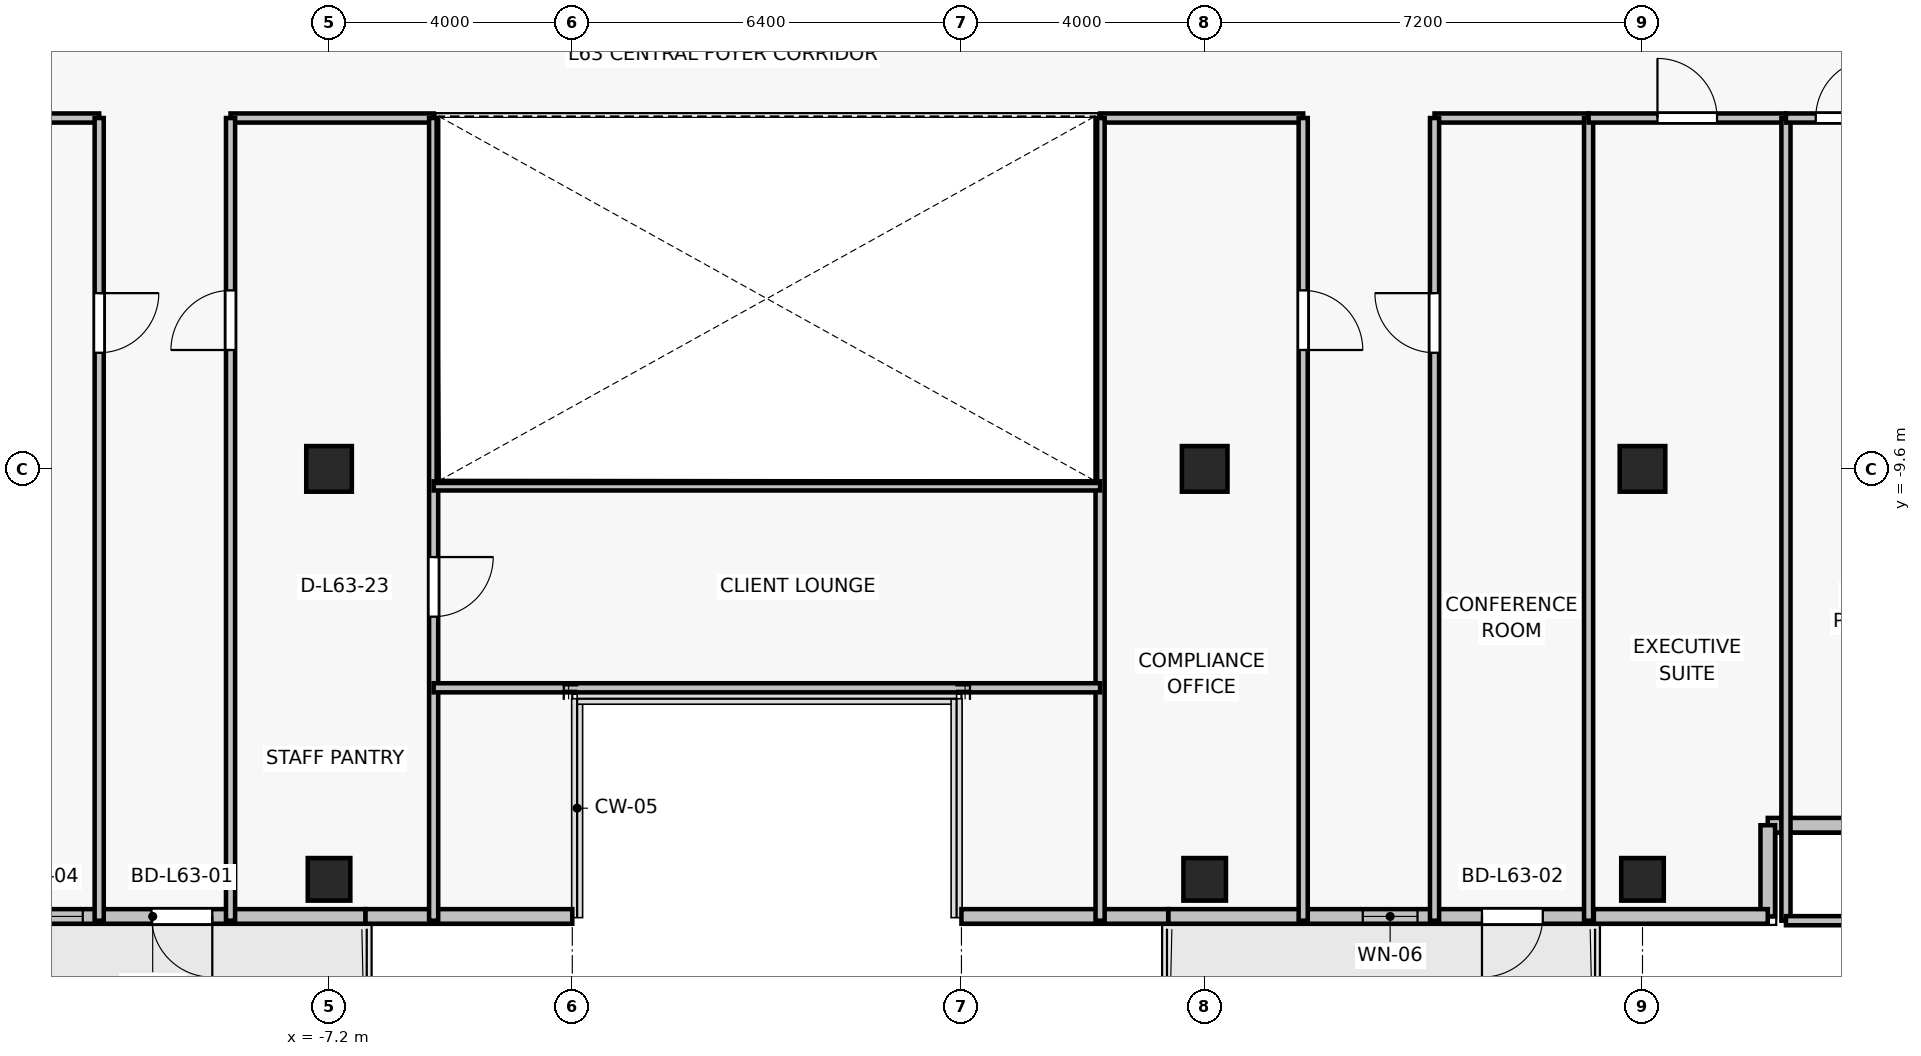
"""IFC4 building model, lengths in metres.
Left out: names, types, materials, properties, quantities, classifications, styles, units other than length and angle.
Written with IfcOpenShell. Run it as: python <this file> out.ifc"""

import sys

from ifc_helpers import new_model, si_unit, direction, frame, frame_2d, origin, origin_2d, place, context, subcontext, project, spatial, rectangle, extrude, source, transform, mapped, element, fill, save


model = new_model("IFC4")
c1 = context("Model", 3, precision=1e-05, world=origin(), true_north=direction((0.0, 1.0)))
c2 = subcontext(c1, "Body", "Model", "MODEL_VIEW")
j1 = project(units=[si_unit("LENGTHUNIT", "METRE"), si_unit("PLANEANGLEUNIT", "RADIAN")], contexts=[c1])
p1 = place(None, origin())
s1 = spatial("IfcSite", under=j1, at=p1, CompositionType="ELEMENT")
p2 = place(p1, origin())
s2 = spatial("IfcBuilding", under=s1, at=p2, CompositionType="ELEMENT")
p3 = place(p2, frame((0.0, 0.0, 225.4)))
s3 = spatial("IfcBuildingStorey", under=s2, at=p3, CompositionType="ELEMENT", Elevation=225.4)
for number, where, z_axis, x_axis in (
    (1, (-7.2, -9.6, 0.0), (0.0, 0.0, 1.0), (1.0, 0.0, 0.0)),
    (2, (7.2, -9.6, 0.0), (0.0, 0.0, 1.0), (1.0, 0.0, 0.0)),
    (3, (14.4, -9.6, 0.0), (0.0, 0.0, 1.0), (1.0, 0.0, 0.0)),
):
    element("IfcColumn", number, at=place(p3, frame(where, z_axis=z_axis, x_axis=x_axis)), inside=s3, PredefinedType="COLUMN", context=c2, shape_type="SweptSolid", body=[
        extrude(rectangle(XDim=0.75, YDim=0.75, at=origin_2d()), origin(), (0.0, 0.0, 1.0), 3.3),
    ])
for number, where, z_axis, x_axis in (
    (4, (-7.2, -16.35, 0.0), (0.0, 0.0, 1.0), (1.0, 0.0, 0.0)),
    (5, (7.2, -16.35, 0.0), (0.0, 0.0, 1.0), (1.0, 0.0, 0.0)),
    (6, (14.4, -16.35, 0.0), (0.0, 0.0, 1.0), (1.0, 0.0, 0.0)),
):
    element("IfcColumn", number, at=place(p3, frame(where, z_axis=z_axis, x_axis=x_axis)), inside=s3, PredefinedType="COLUMN", context=c2, shape_type="SweptSolid", body=[
        extrude(rectangle(XDim=0.7, YDim=0.7, at=origin_2d()), origin(), (0.0, 0.0, 1.0), 3.3),
    ])
p4 = place(p3, frame((-6.6, -16.96, 0.0), z_axis=(0.0, 0.0, 1.0), x_axis=(-1.0, 0.0, 0.0)))
e7 = element("IfcWall", 7, at=p4, inside=s3, PredefinedType="SOLIDWALL", context=c2, shape_type="SweptSolid", body=[
    extrude(rectangle(XDim=7.0, YDim=0.24, at=frame_2d((3.5, 0.0))), origin(), (0.0, 0.0, 1.0), 2.665),
])
p5 = place(p4, frame((2.52, 0.0, 0.0)))
e8 = element("IfcOpeningElement", 8, at=p5, cuts=e7, PredefinedType="OPENING", context=c2, shape_type="SweptSolid", body=[
    extrude(rectangle(XDim=1.0, YDim=2.2, at=frame_2d((0.5, 1.1))), frame((0.0, 0.13, 0.0), z_axis=(0.0, -1.0, 0.0), x_axis=(1.0, 0.0, 0.0)), (0.0, 0.0, 1.0), 0.26),
])
p6 = place(p4, frame((4.65, 0.0, 0.85)))
e9 = element("IfcOpeningElement", 9, at=p6, cuts=e7, PredefinedType="OPENING", context=c2, shape_type="SweptSolid", body=[
    extrude(rectangle(XDim=1.2, YDim=1.5, at=frame_2d((0.6, 0.75))), frame((0.0, 0.13, 0.0), z_axis=(0.0, -1.0, 0.0), x_axis=(1.0, 0.0, 0.0)), (0.0, 0.0, 1.0), 0.26),
])
p7 = place(p3, frame((13.6, -16.96, 0.0), z_axis=(0.0, 0.0, 1.0), x_axis=(-1.0, 0.0, 0.0)))
e10 = element("IfcWall", 10, at=p7, inside=s3, PredefinedType="SOLIDWALL", context=c2, shape_type="SweptSolid", body=[
    extrude(rectangle(XDim=7.0, YDim=0.24, at=frame_2d((3.5, 0.0))), origin(), (0.0, 0.0, 1.0), 2.665),
])
p8 = place(p7, frame((0.84, 0.0, 0.0)))
e11 = element("IfcOpeningElement", 11, at=p8, cuts=e10, PredefinedType="OPENING", context=c2, shape_type="SweptSolid", body=[
    extrude(rectangle(XDim=1.0, YDim=2.2, at=frame_2d((0.5, 1.1))), frame((0.0, 0.13, 0.0), z_axis=(0.0, -1.0, 0.0), x_axis=(1.0, 0.0, 0.0)), (0.0, 0.0, 1.0), 0.26),
])
p9 = place(p7, frame((2.9, 0.0, 0.85)))
e12 = element("IfcOpeningElement", 12, at=p9, cuts=e10, PredefinedType="OPENING", context=c2, shape_type="SweptSolid", body=[
    extrude(rectangle(XDim=0.9, YDim=1.35, at=frame_2d((0.45, 0.675))), frame((0.0, 0.13, 0.0), z_axis=(0.0, -1.0, 0.0), x_axis=(1.0, 0.0, 0.0)), (0.0, 0.0, 1.0), 0.26),
])
for number, where, z_axis, x_axis in (
    (13, (16.46, -15.46, 0.0), (0.0, 0.0, 1.0), (1.0, 0.0, 0.0)),
    (14, (16.46, -16.96, 0.0), (0.0, 0.0, 1.0), (0.0, 1.0, 0.0)),
):
    element("IfcWall", number, at=place(p3, frame(where, z_axis=z_axis, x_axis=x_axis)), inside=s3, PredefinedType="SOLIDWALL", context=c2, shape_type="SweptSolid", body=[
        extrude(rectangle(XDim=1.5, YDim=0.24, at=frame_2d((0.75, 0.0))), origin(), (0.0, 0.0, 1.0), 3.075),
    ])
p10 = place(p3, frame((13.6, -16.96, 0.0), z_axis=(0.0, 0.0, 1.0), x_axis=(1.0, 0.0, 0.0)))
e15 = element("IfcWall", 15, at=p10, inside=s3, PredefinedType="SOLIDWALL", context=c2, shape_type="SweptSolid", body=[
    extrude(rectangle(XDim=2.86, YDim=0.24, at=frame_2d((1.43, 0.0))), origin(), (0.0, 0.0, 1.0), 2.665),
])
for number, where, z_axis, x_axis in (
    (16, (3.2, -16.96, 0.0), (0.0, 0.0, 1.0), (1.0, 0.0, 0.0)),
    (17, (-6.6, -16.96, 0.0), (0.0, 0.0, 1.0), (1.0, 0.0, 0.0)),
):
    element("IfcWall", number, at=place(p3, frame(where, z_axis=z_axis, x_axis=x_axis)), inside=s3, PredefinedType="SOLIDWALL", context=c2, shape_type="SweptSolid", body=[
        extrude(rectangle(XDim=3.4, YDim=0.24, at=frame_2d((1.7, 0.0))), origin(), (0.0, 0.0, 1.0), 3.075),
    ])
p11 = place(p3, frame((-23.53, -3.83, 0.0), z_axis=(0.0, 0.0, 1.0), x_axis=(1.0, 0.0, 0.0)))
e18 = element("IfcWall", 18, at=p11, inside=s3, PredefinedType="PARTITIONING", context=c2, shape_type="SweptSolid", body=[
    extrude(rectangle(XDim=12.55, YDim=0.15, at=frame_2d((6.275, 0.0))), origin(), (0.0, 0.0, 1.0), 2.615),
])
p12 = place(p3, frame((-10.98, -3.83, 0.0), z_axis=(0.0, 0.0, 1.0), x_axis=(0.0, -1.0, 0.0)))
e19 = element("IfcWall", 19, at=p12, inside=s3, PredefinedType="PARTITIONING", context=c2, shape_type="SweptSolid", body=[
    extrude(rectangle(XDim=13.2, YDim=0.15, at=frame_2d((6.6, 0.0))), origin(), (0.0, 0.0, 1.0), 2.615),
])
p13 = place(p12, frame((2.88, 0.0, 0.0)))
e20 = element("IfcOpeningElement", 20, at=p13, cuts=e19, PredefinedType="OPENING", context=c2, shape_type="SweptSolid", body=[
    extrude(rectangle(XDim=0.98, YDim=2.15, at=frame_2d((0.49, 1.075))), frame((0.0, 0.085, 0.0), z_axis=(0.0, -1.0, 0.0), x_axis=(1.0, 0.0, 0.0)), (0.0, 0.0, 1.0), 0.17),
])
p14 = place(p3, frame((10.98, -3.83, 0.0), z_axis=(0.0, 0.0, 1.0), x_axis=(1.0, 0.0, 0.0)))
e21 = element("IfcWall", 21, at=p14, inside=s3, PredefinedType="PARTITIONING", context=c2, shape_type="SweptSolid", body=[
    extrude(rectangle(XDim=2.533, YDim=0.15, at=frame_2d((1.267, 0.0))), origin(), (0.0, 0.0, 1.0), 3.075),
])
p15 = place(p3, frame((10.98, -17.03, 0.0), z_axis=(0.0, 0.0, 1.0), x_axis=(0.0, 1.0, 0.0)))
e22 = element("IfcWall", 22, at=p15, inside=s3, PredefinedType="PARTITIONING", context=c2, shape_type="SweptSolid", body=[
    extrude(rectangle(XDim=13.2, YDim=0.15, at=frame_2d((6.6, 0.0))), origin(), (0.0, 0.0, 1.0), 2.615),
])
p16 = place(p15, frame((9.34, 0.0, 0.0)))
e23 = element("IfcOpeningElement", 23, at=p16, cuts=e22, PredefinedType="OPENING", context=c2, shape_type="SweptSolid", body=[
    extrude(rectangle(XDim=0.98, YDim=2.15, at=frame_2d((0.49, 1.075))), frame((0.0, 0.085, 0.0), z_axis=(0.0, -1.0, 0.0), x_axis=(1.0, 0.0, 0.0)), (0.0, 0.0, 1.0), 0.17),
])
p17 = place(p3, frame((13.513, -3.83, 0.0), z_axis=(0.0, 0.0, 1.0), x_axis=(0.0, -1.0, 0.0)))
e24 = element("IfcWall", 24, at=p17, inside=s3, PredefinedType="PARTITIONING", context=c2, shape_type="SweptSolid", body=[
    extrude(rectangle(XDim=13.2, YDim=0.15, at=frame_2d((6.6, 0.0))), origin(), (0.0, 0.0, 1.0), 2.615),
])
p18 = place(p3, frame((13.513, -3.83, 0.0), z_axis=(0.0, 0.0, 1.0), x_axis=(1.0, 0.0, 0.0)))
e25 = element("IfcWall", 25, at=p18, inside=s3, PredefinedType="PARTITIONING", context=c2, shape_type="SweptSolid", body=[
    extrude(rectangle(XDim=3.246, YDim=0.15, at=frame_2d((1.623, 0.0))), origin(), (0.0, 0.0, 1.0), 2.615),
])
p19 = place(p18, frame((1.133, 0.0, 0.0)))
e26 = element("IfcOpeningElement", 26, at=p19, cuts=e25, PredefinedType="OPENING", context=c2, shape_type="SweptSolid", body=[
    extrude(rectangle(XDim=0.98, YDim=2.15, at=frame_2d((0.49, 1.075))), frame((0.0, 0.085, 0.0), z_axis=(0.0, -1.0, 0.0), x_axis=(1.0, 0.0, 0.0)), (0.0, 0.0, 1.0), 0.17),
])
p20 = place(p3, frame((16.759, -3.83, 0.0), z_axis=(0.0, 0.0, 1.0), x_axis=(0.0, -1.0, 0.0)))
e27 = element("IfcWall", 27, at=p20, inside=s3, PredefinedType="PARTITIONING", context=c2, shape_type="SweptSolid", body=[
    extrude(rectangle(XDim=13.2, YDim=0.15, at=frame_2d((6.6, 0.0))), origin(), (0.0, 0.0, 1.0), 2.615),
])
p21 = place(p3, frame((19.53, -17.03, 0.0), z_axis=(0.0, 0.0, 1.0), x_axis=(-1.0, 0.0, 0.0)))
e28 = element("IfcWall", 28, at=p21, inside=s3, PredefinedType="PARTITIONING", context=c2, shape_type="SweptSolid", body=[
    extrude(rectangle(XDim=2.771, YDim=0.15, at=frame_2d((1.385, 0.0))), origin(), (0.0, 0.0, 1.0), 3.075),
])
p22 = place(p3, frame((16.759, -3.83, 0.0), z_axis=(0.0, 0.0, 1.0), x_axis=(1.0, 0.0, 0.0)))
e29 = element("IfcWall", 29, at=p22, inside=s3, PredefinedType="PARTITIONING", context=c2, shape_type="SweptSolid", body=[
    extrude(rectangle(XDim=2.771, YDim=0.15, at=frame_2d((1.385, 0.0))), origin(), (0.0, 0.0, 1.0), 2.765),
])
p23 = place(p22, frame((0.49, 0.0, 0.0)))
e30 = element("IfcOpeningElement", 30, at=p23, cuts=e29, PredefinedType="OPENING", context=c2, shape_type="SweptSolid", body=[
    extrude(rectangle(XDim=0.98, YDim=2.15, at=frame_2d((0.49, 1.075))), frame((0.0, 0.085, 0.0), z_axis=(0.0, -1.0, 0.0), x_axis=(1.0, 0.0, 0.0)), (0.0, 0.0, 1.0), 0.17),
])
p24 = place(p3, frame((-8.82, -3.83, 0.0), z_axis=(0.0, 0.0, 1.0), x_axis=(1.0, 0.0, 0.0)))
e31 = element("IfcWall", 31, at=p24, inside=s3, PredefinedType="PARTITIONING", context=c2, shape_type="SweptSolid", body=[
    extrude(rectangle(XDim=3.34, YDim=0.15, at=frame_2d((1.67, 0.0))), origin(), (0.0, 0.0, 1.0), 2.615),
])
p25 = place(p3, frame((-8.82, -17.03, 0.0), z_axis=(0.0, 0.0, 1.0), x_axis=(0.0, 1.0, 0.0)))
e32 = element("IfcWall", 32, at=p25, inside=s3, PredefinedType="PARTITIONING", context=c2, shape_type="SweptSolid", body=[
    extrude(rectangle(XDim=13.2, YDim=0.15, at=frame_2d((6.6, 0.0))), origin(), (0.0, 0.0, 1.0), 2.615),
])
p26 = place(p25, frame((9.385, 0.0, 0.0)))
e33 = element("IfcOpeningElement", 33, at=p26, cuts=e32, PredefinedType="OPENING", context=c2, shape_type="SweptSolid", body=[
    extrude(rectangle(XDim=0.98, YDim=2.15, at=frame_2d((0.49, 1.075))), frame((0.0, 0.085, 0.0), z_axis=(0.0, -1.0, 0.0), x_axis=(1.0, 0.0, 0.0)), (0.0, 0.0, 1.0), 0.17),
])
p27 = place(p3, frame((-5.48, -3.83, 0.0), z_axis=(0.0, 0.0, 1.0), x_axis=(0.0, -1.0, 0.0)))
e34 = element("IfcWall", 34, at=p27, inside=s3, PredefinedType="PARTITIONING", context=c2, shape_type="SweptSolid", body=[
    extrude(rectangle(XDim=13.2, YDim=0.15, at=frame_2d((6.6, 0.0))), origin(), (0.0, 0.0, 1.0), 2.615),
])
p28 = place(p27, frame((7.22, 0.0, 0.0)))
e35 = element("IfcOpeningElement", 35, at=p28, cuts=e34, PredefinedType="OPENING", context=c2, shape_type="SweptSolid", body=[
    extrude(rectangle(XDim=0.98, YDim=2.15, at=frame_2d((0.49, 1.075))), frame((0.0, 0.085, 0.0), z_axis=(0.0, -1.0, 0.0), x_axis=(1.0, 0.0, 0.0)), (0.0, 0.0, 1.0), 0.17),
])
p29 = place(p3, frame((5.48, -3.83, 0.0), z_axis=(0.0, 0.0, 1.0), x_axis=(1.0, 0.0, 0.0)))
e36 = element("IfcWall", 36, at=p29, inside=s3, PredefinedType="PARTITIONING", context=c2, shape_type="SweptSolid", body=[
    extrude(rectangle(XDim=3.34, YDim=0.15, at=frame_2d((1.67, 0.0))), origin(), (0.0, 0.0, 1.0), 2.615),
])
p30 = place(p3, frame((5.48, -17.03, 0.0), z_axis=(0.0, 0.0, 1.0), x_axis=(0.0, 1.0, 0.0)))
e37 = element("IfcWall", 37, at=p30, inside=s3, PredefinedType="PARTITIONING", context=c2, shape_type="SweptSolid", body=[
    extrude(rectangle(XDim=13.2, YDim=0.15, at=frame_2d((6.6, 0.0))), origin(), (0.0, 0.0, 1.0), 2.615),
])
p31 = place(p3, frame((8.82, -3.83, 0.0), z_axis=(0.0, 0.0, 1.0), x_axis=(0.0, -1.0, 0.0)))
e38 = element("IfcWall", 38, at=p31, inside=s3, PredefinedType="PARTITIONING", context=c2, shape_type="SweptSolid", body=[
    extrude(rectangle(XDim=13.2, YDim=0.15, at=frame_2d((6.6, 0.0))), origin(), (0.0, 0.0, 1.0), 2.615),
])
p32 = place(p31, frame((2.835, 0.0, 0.0)))
e39 = element("IfcOpeningElement", 39, at=p32, cuts=e38, PredefinedType="OPENING", context=c2, shape_type="SweptSolid", body=[
    extrude(rectangle(XDim=0.98, YDim=2.15, at=frame_2d((0.49, 1.075))), frame((0.0, 0.085, 0.0), z_axis=(0.0, -1.0, 0.0), x_axis=(1.0, 0.0, 0.0)), (0.0, 0.0, 1.0), 0.17),
])
p33 = place(p3, frame((5.48, -13.2, 0.0), z_axis=(0.0, 0.0, 1.0), x_axis=(-1.0, 0.0, 0.0)))
e40 = element("IfcWall", 40, at=p33, inside=s3, PredefinedType="PARTITIONING", context=c2, shape_type="SweptSolid", body=[
    extrude(rectangle(XDim=10.96, YDim=0.15, at=frame_2d((5.48, 0.0))), origin(), (0.0, 0.0, 1.0), 2.765),
])
p34 = place(p3, frame((-5.48, -9.88, 0.0), z_axis=(0.0, 0.0, 1.0), x_axis=(1.0, 0.0, 0.0)))
e41 = element("IfcWall", 41, at=p34, inside=s3, PredefinedType="PARTITIONING", context=c2, shape_type="SweptSolid", body=[
    extrude(rectangle(XDim=10.96, YDim=0.15, at=frame_2d((5.48, 0.0))), origin(), (0.0, 0.0, 1.0), 2.615),
])
m1 = source(origin(), c2, "Body", "SweptSolid", [
    extrude(rectangle(XDim=1.0, YDim=2.2, at=frame_2d((0.5, 1.1))), frame((0.0, 0.025, 0.0), z_axis=(0.0, -1.0, 0.0), x_axis=(1.0, 0.0, 0.0)), (0.0, 0.0, 1.0), 0.05),
])
p35 = place(p5, origin())
e42 = element("IfcDoor", 42, at=p35, inside=s3, OperationType="SINGLE_SWING_LEFT", PredefinedType="DOOR", context=c2, shape_type="MappedRepresentation", body=[
    mapped(m1, transform((0.0, 0.0, 0.0), x_axis=(1.0, 0.0, 0.0), y_axis=(0.0, 1.0, 0.0), z_axis=(0.0, 0.0, 1.0), scale=1.0)),
])
fill(e8, e42)
m2 = source(origin(), c2, "Body", "SweptSolid", [
    extrude(rectangle(XDim=1.2, YDim=1.5, at=frame_2d((0.6, 0.75))), frame((0.0, 0.03, 0.0), z_axis=(0.0, -1.0, 0.0), x_axis=(1.0, 0.0, 0.0)), (0.0, 0.0, 1.0), 0.06),
])
p36 = place(p6, origin())
e43 = element("IfcWindow", 43, at=p36, inside=s3, PartitioningType="SINGLE_PANEL", PredefinedType="WINDOW", context=c2, shape_type="MappedRepresentation", body=[
    mapped(m2, transform((0.0, 0.0, 0.0), x_axis=(1.0, 0.0, 0.0), y_axis=(0.0, 1.0, 0.0), z_axis=(0.0, 0.0, 1.0), scale=1.0)),
])
fill(e9, e43)
p37 = place(p8, origin())
e44 = element("IfcDoor", 44, at=p37, inside=s3, OperationType="SINGLE_SWING_RIGHT", PredefinedType="DOOR", context=c2, shape_type="MappedRepresentation", body=[
    mapped(m1, transform((0.0, 0.0, 0.0), x_axis=(1.0, 0.0, 0.0), y_axis=(0.0, 1.0, 0.0), z_axis=(0.0, 0.0, 1.0), scale=1.0)),
])
fill(e11, e44)
m3 = source(origin(), c2, "Body", "SweptSolid", [
    extrude(rectangle(XDim=0.9, YDim=1.35, at=frame_2d((0.45, 0.675))), frame((0.0, 0.03, 0.0), z_axis=(0.0, -1.0, 0.0), x_axis=(1.0, 0.0, 0.0)), (0.0, 0.0, 1.0), 0.06),
])
p38 = place(p9, origin())
e45 = element("IfcWindow", 45, at=p38, inside=s3, PartitioningType="SINGLE_PANEL", PredefinedType="WINDOW", context=c2, shape_type="MappedRepresentation", body=[
    mapped(m3, transform((0.0, 0.0, 0.0), x_axis=(1.0, 0.0, 0.0), y_axis=(0.0, 1.0, 0.0), z_axis=(0.0, 0.0, 1.0), scale=1.0)),
])
fill(e12, e45)
m4 = source(origin(), c2, "Body", "SweptSolid", [
    extrude(rectangle(XDim=0.98, YDim=2.15, at=frame_2d((0.49, 1.075))), frame((0.0, 0.025, 0.0), z_axis=(0.0, -1.0, 0.0), x_axis=(1.0, 0.0, 0.0)), (0.0, 0.0, 1.0), 0.05),
])
p39 = place(p13, origin())
e46 = element("IfcDoor", 46, at=p39, inside=s3, OperationType="SINGLE_SWING_LEFT", PredefinedType="DOOR", context=c2, shape_type="MappedRepresentation", body=[
    mapped(m4, transform((0.0, 0.0, 0.0), x_axis=(1.0, 0.0, 0.0), y_axis=(0.0, 1.0, 0.0), z_axis=(0.0, 0.0, 1.0), scale=1.0)),
])
fill(e20, e46)
p40 = place(p16, origin())
e47 = element("IfcDoor", 47, at=p40, inside=s3, OperationType="SINGLE_SWING_RIGHT", PredefinedType="DOOR", context=c2, shape_type="MappedRepresentation", body=[
    mapped(m4, transform((0.0, 0.0, 0.0), x_axis=(1.0, 0.0, 0.0), y_axis=(0.0, 1.0, 0.0), z_axis=(0.0, 0.0, 1.0), scale=1.0)),
])
fill(e23, e47)
p41 = place(p19, origin())
e48 = element("IfcDoor", 48, at=p41, inside=s3, OperationType="SINGLE_SWING_LEFT", PredefinedType="DOOR", context=c2, shape_type="MappedRepresentation", body=[
    mapped(m4, transform((0.0, 0.0, 0.0), x_axis=(1.0, 0.0, 0.0), y_axis=(0.0, 1.0, 0.0), z_axis=(0.0, 0.0, 1.0), scale=1.0)),
])
fill(e26, e48)
p42 = place(p23, origin())
e49 = element("IfcDoor", 49, at=p42, inside=s3, OperationType="SINGLE_SWING_RIGHT", PredefinedType="DOOR", context=c2, shape_type="MappedRepresentation", body=[
    mapped(m4, transform((0.0, 0.0, 0.0), x_axis=(1.0, 0.0, 0.0), y_axis=(0.0, 1.0, 0.0), z_axis=(0.0, 0.0, 1.0), scale=1.0)),
])
fill(e30, e49)
p43 = place(p26, origin())
e50 = element("IfcDoor", 50, at=p43, inside=s3, OperationType="SINGLE_SWING_LEFT", PredefinedType="DOOR", context=c2, shape_type="MappedRepresentation", body=[
    mapped(m4, transform((0.0, 0.0, 0.0), x_axis=(1.0, 0.0, 0.0), y_axis=(0.0, 1.0, 0.0), z_axis=(0.0, 0.0, 1.0), scale=1.0)),
])
fill(e33, e50)
p44 = place(p32, origin())
e51 = element("IfcDoor", 51, at=p44, inside=s3, OperationType="SINGLE_SWING_RIGHT", PredefinedType="DOOR", context=c2, shape_type="MappedRepresentation", body=[
    mapped(m4, transform((0.0, 0.0, 0.0), x_axis=(1.0, 0.0, 0.0), y_axis=(0.0, 1.0, 0.0), z_axis=(0.0, 0.0, 1.0), scale=1.0)),
])
fill(e39, e51)
p45 = place(p28, origin())
e52 = element("IfcDoor", 52, at=p45, inside=s3, OperationType="SINGLE_SWING_LEFT", PredefinedType="DOOR", context=c2, shape_type="MappedRepresentation", body=[
    mapped(m4, transform((0.0, 0.0, 0.0), x_axis=(1.0, 0.0, 0.0), y_axis=(0.0, 1.0, 0.0), z_axis=(0.0, 0.0, 1.0), scale=1.0)),
])
fill(e35, e52)
save(model, sys.argv[1])
